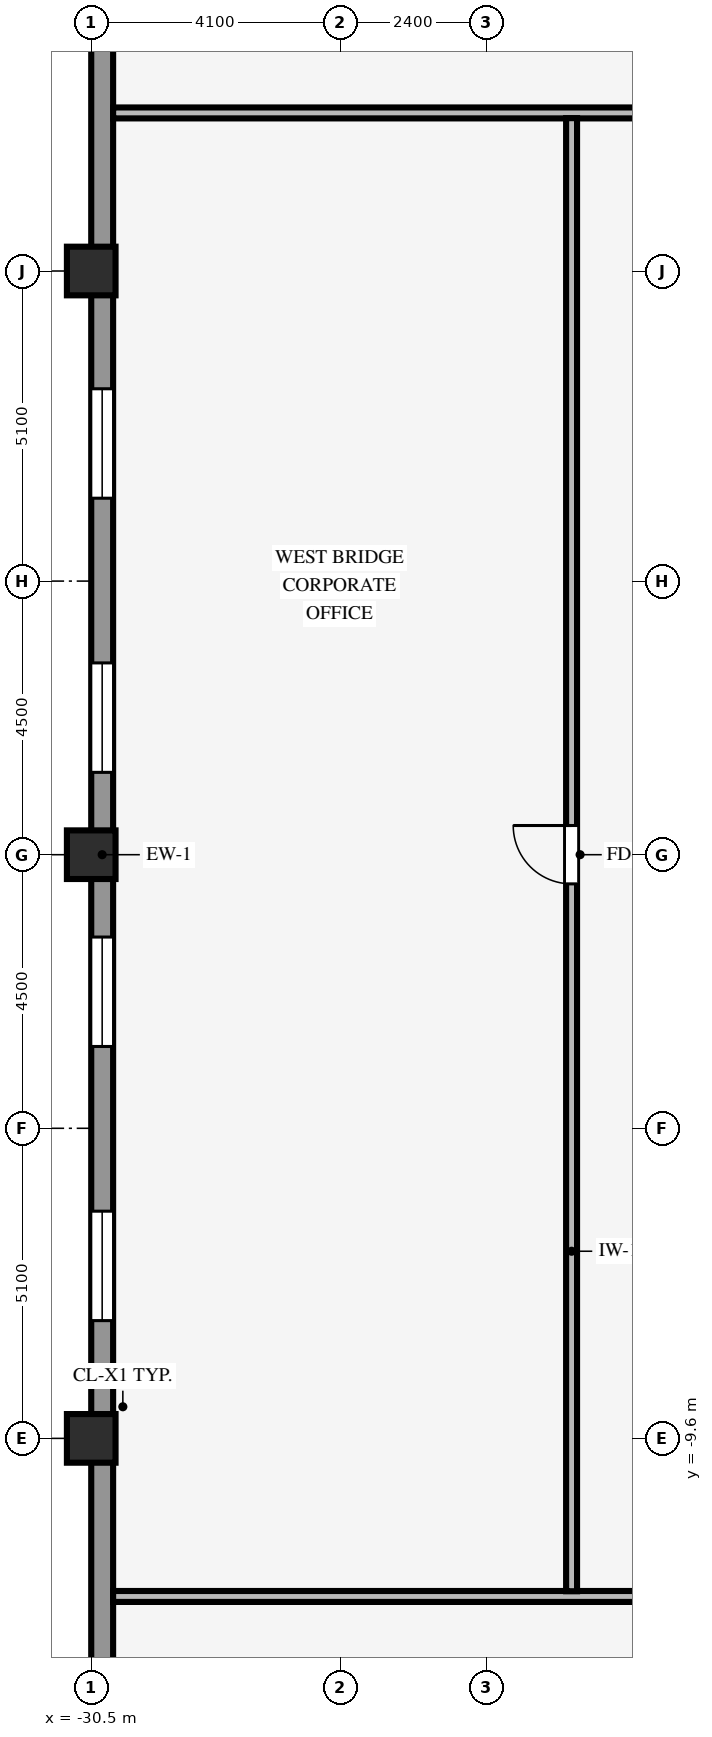
"""IFC4 building model, lengths in metres.
Left out: names, types, materials, properties, quantities, classifications, styles, units other than length and angle.
Written with IfcOpenShell. Run it as: python <this file> out.ifc"""

import sys

from ifc_helpers import new_model, si_unit, direction, frame, frame_2d, origin, origin_2d, place, context, subcontext, project, spatial, rectangle, hollow_rectangle, extrude, source, transform, mapped, element, fill, save


model = new_model("IFC4")
c1 = context("Model", 3, precision=1e-05, world=origin(), true_north=direction((0.0, 1.0)))
c2 = subcontext(c1, "Body", "Model", "MODEL_VIEW")
j1 = project(units=[si_unit("LENGTHUNIT", "METRE"), si_unit("PLANEANGLEUNIT", "RADIAN")], contexts=[c1])
p1 = place(None, origin())
s1 = spatial("IfcSite", under=j1, at=p1, CompositionType="ELEMENT")
p2 = place(p1, origin())
s2 = spatial("IfcBuilding", under=s1, at=p2, CompositionType="ELEMENT")
p3 = place(p2, frame((0.0, 0.0, 18.4)))
s3 = spatial("IfcBuildingStorey", under=s2, at=p3, CompositionType="ELEMENT", Elevation=18.4)
for number, where, z_axis, x_axis in (
    (1, (-30.5, -9.6, 0.0), (0.0, 0.0, 1.0), (1.0, 0.0, 0.0)),
    (2, (-30.5, 0.0, 0.0), (0.0, 0.0, 1.0), (1.0, 0.0, 0.0)),
    (3, (-30.5, 9.6, 0.0), (0.0, 0.0, 1.0), (1.0, 0.0, 0.0)),
):
    element("IfcColumn", number, at=place(p3, frame(where, z_axis=z_axis, x_axis=x_axis)), inside=s3, PredefinedType="COLUMN", context=c2, shape_type="SweptSolid", body=[
        extrude(hollow_rectangle(XDim=0.8, YDim=0.8, WallThickness=0.055, InnerFilletRadius=0.055, OuterFilletRadius=0.11, at=origin_2d()), origin(), (0.0, 0.0, 1.0), 4.2),
    ])
p4 = place(p3, frame((-30.32, -23.544, 0.0), z_axis=(0.0, 0.0, 1.0), x_axis=(0.0, 1.0, 0.0)))
e4 = element("IfcWall", 4, at=p4, inside=s3, PredefinedType="STANDARD", context=c2, shape_type="SweptSolid", body=[
    extrude(rectangle(XDim=47.088, YDim=0.36, at=frame_2d((23.544, 0.0))), origin(), (0.0, 0.0, 1.0), 3.535),
])
p5 = place(p4, frame((2.354, 0.0, 0.85)))
e5 = element("IfcOpeningElement", 5, at=p5, cuts=e4, PredefinedType="OPENING", context=c2, shape_type="SweptSolid", body=[
    extrude(rectangle(XDim=1.8, YDim=2.35, at=frame_2d((0.9, 1.175))), frame((0.0, 0.19, 0.0), z_axis=(0.0, -1.0, 0.0), x_axis=(1.0, 0.0, 0.0)), (0.0, 0.0, 1.0), 0.38),
])
p6 = place(p4, frame((7.313, 0.0, 0.85)))
e6 = element("IfcOpeningElement", 6, at=p6, cuts=e4, PredefinedType="OPENING", context=c2, shape_type="SweptSolid", body=[
    extrude(rectangle(XDim=1.8, YDim=2.35, at=frame_2d((0.9, 1.175))), frame((0.0, 0.19, 0.0), z_axis=(0.0, -1.0, 0.0), x_axis=(1.0, 0.0, 0.0)), (0.0, 0.0, 1.0), 0.38),
])
p7 = place(p4, frame((15.881, 0.0, 0.85)))
e7 = element("IfcOpeningElement", 7, at=p7, cuts=e4, PredefinedType="OPENING", context=c2, shape_type="SweptSolid", body=[
    extrude(rectangle(XDim=1.8, YDim=2.35, at=frame_2d((0.9, 1.175))), frame((0.0, 0.19, 0.0), z_axis=(0.0, -1.0, 0.0), x_axis=(1.0, 0.0, 0.0)), (0.0, 0.0, 1.0), 0.38),
])
p8 = place(p4, frame((20.39, 0.0, 0.85)))
e8 = element("IfcOpeningElement", 8, at=p8, cuts=e4, PredefinedType="OPENING", context=c2, shape_type="SweptSolid", body=[
    extrude(rectangle(XDim=1.8, YDim=2.35, at=frame_2d((0.9, 1.175))), frame((0.0, 0.19, 0.0), z_axis=(0.0, -1.0, 0.0), x_axis=(1.0, 0.0, 0.0)), (0.0, 0.0, 1.0), 0.38),
])
p9 = place(p4, frame((24.898, 0.0, 0.85)))
e9 = element("IfcOpeningElement", 9, at=p9, cuts=e4, PredefinedType="OPENING", context=c2, shape_type="SweptSolid", body=[
    extrude(rectangle(XDim=1.8, YDim=2.35, at=frame_2d((0.9, 1.175))), frame((0.0, 0.19, 0.0), z_axis=(0.0, -1.0, 0.0), x_axis=(1.0, 0.0, 0.0)), (0.0, 0.0, 1.0), 0.38),
])
p10 = place(p4, frame((29.407, 0.0, 0.85)))
e10 = element("IfcOpeningElement", 10, at=p10, cuts=e4, PredefinedType="OPENING", context=c2, shape_type="SweptSolid", body=[
    extrude(rectangle(XDim=1.8, YDim=2.35, at=frame_2d((0.9, 1.175))), frame((0.0, 0.19, 0.0), z_axis=(0.0, -1.0, 0.0), x_axis=(1.0, 0.0, 0.0)), (0.0, 0.0, 1.0), 0.38),
])
p11 = place(p4, frame((37.975, 0.0, 0.85)))
e11 = element("IfcOpeningElement", 11, at=p11, cuts=e4, PredefinedType="OPENING", context=c2, shape_type="SweptSolid", body=[
    extrude(rectangle(XDim=1.8, YDim=2.35, at=frame_2d((0.9, 1.175))), frame((0.0, 0.19, 0.0), z_axis=(0.0, -1.0, 0.0), x_axis=(1.0, 0.0, 0.0)), (0.0, 0.0, 1.0), 0.38),
])
p12 = place(p4, frame((42.934, 0.0, 0.85)))
e12 = element("IfcOpeningElement", 12, at=p12, cuts=e4, PredefinedType="OPENING", context=c2, shape_type="SweptSolid", body=[
    extrude(rectangle(XDim=1.8, YDim=2.35, at=frame_2d((0.9, 1.175))), frame((0.0, 0.19, 0.0), z_axis=(0.0, -1.0, 0.0), x_axis=(1.0, 0.0, 0.0)), (0.0, 0.0, 1.0), 0.38),
])
p13 = place(p3, frame((-30.14, -12.2, 0.0), z_axis=(0.0, 0.0, 1.0), x_axis=(1.0, 0.0, 0.0)))
e13 = element("IfcWall", 13, at=p13, inside=s3, PredefinedType="PARTITIONING", context=c2, shape_type="SweptSolid", body=[
    extrude(rectangle(XDim=18.74, YDim=0.18, at=frame_2d((9.37, 0.0))), origin(), (0.0, 0.0, 1.0), 4.19),
])
p14 = place(p13, frame((14.06, 0.0, 0.0)))
e14 = element("IfcOpeningElement", 14, at=p14, cuts=e13, PredefinedType="OPENING", context=c2, shape_type="SweptSolid", body=[
    extrude(rectangle(XDim=0.96, YDim=2.1, at=frame_2d((0.48, 1.05))), frame((0.0, 0.1, 0.0), z_axis=(0.0, -1.0, 0.0), x_axis=(1.0, 0.0, 0.0)), (0.0, 0.0, 1.0), 0.2),
])
p15 = place(p3, frame((-30.14, 12.2, 0.0), z_axis=(0.0, 0.0, 1.0), x_axis=(1.0, 0.0, 0.0)))
e15 = element("IfcWall", 15, at=p15, inside=s3, PredefinedType="PARTITIONING", context=c2, shape_type="SweptSolid", body=[
    extrude(rectangle(XDim=18.74, YDim=0.18, at=frame_2d((9.37, 0.0))), origin(), (0.0, 0.0, 1.0), 4.19),
])
p16 = place(p15, frame((14.06, 0.0, 0.0)))
e16 = element("IfcOpeningElement", 16, at=p16, cuts=e15, PredefinedType="OPENING", context=c2, shape_type="SweptSolid", body=[
    extrude(rectangle(XDim=0.96, YDim=2.1, at=frame_2d((0.48, 1.05))), frame((0.0, 0.1, 0.0), z_axis=(0.0, -1.0, 0.0), x_axis=(1.0, 0.0, 0.0)), (0.0, 0.0, 1.0), 0.2),
])
p17 = place(p3, frame((-22.6, -12.114, 0.0), z_axis=(0.0, 0.0, 1.0), x_axis=(0.0, 1.0, 0.0)))
e17 = element("IfcWall", 17, at=p17, inside=s3, PredefinedType="PARTITIONING", context=c2, shape_type="SweptSolid", body=[
    extrude(rectangle(XDim=24.228, YDim=0.18, at=frame_2d((12.114, 0.0))), origin(), (0.0, 0.0, 1.0), 4.19),
])
p18 = place(p17, frame((11.634, 0.0, 0.0)))
e18 = element("IfcOpeningElement", 18, at=p18, cuts=e17, PredefinedType="OPENING", context=c2, shape_type="SweptSolid", body=[
    extrude(rectangle(XDim=0.96, YDim=2.1, at=frame_2d((0.48, 1.05))), frame((0.0, 0.1, 0.0), z_axis=(0.0, -1.0, 0.0), x_axis=(1.0, 0.0, 0.0)), (0.0, 0.0, 1.0), 0.2),
])
m1 = source(origin(), c2, "Body", "SweptSolid", [
    extrude(rectangle(XDim=1.8, YDim=2.35, at=frame_2d((0.9, 1.175))), frame((0.0, 0.03, 0.0), z_axis=(0.0, -1.0, 0.0), x_axis=(1.0, 0.0, 0.0)), (0.0, 0.0, 1.0), 0.06),
])
p19 = place(p7, origin())
e19 = element("IfcWindow", 19, at=p19, inside=s3, PartitioningType="SINGLE_PANEL", PredefinedType="WINDOW", context=c2, shape_type="MappedRepresentation", body=[
    mapped(m1, transform((0.0, 0.0, 0.0), scale=1.0)),
])
fill(e7, e19)
p20 = place(p8, origin())
e20 = element("IfcWindow", 20, at=p20, inside=s3, PartitioningType="SINGLE_PANEL", PredefinedType="WINDOW", context=c2, shape_type="MappedRepresentation", body=[
    mapped(m1, transform((0.0, 0.0, 0.0), scale=1.0)),
])
fill(e8, e20)
p21 = place(p9, origin())
e21 = element("IfcWindow", 21, at=p21, inside=s3, PartitioningType="SINGLE_PANEL", PredefinedType="WINDOW", context=c2, shape_type="MappedRepresentation", body=[
    mapped(m1, transform((0.0, 0.0, 0.0), scale=1.0)),
])
fill(e9, e21)
p22 = place(p10, origin())
e22 = element("IfcWindow", 22, at=p22, inside=s3, PartitioningType="SINGLE_PANEL", PredefinedType="WINDOW", context=c2, shape_type="MappedRepresentation", body=[
    mapped(m1, transform((0.0, 0.0, 0.0), scale=1.0)),
])
fill(e10, e22)
m2 = source(origin(), c2, "Body", "SweptSolid", [
    extrude(rectangle(XDim=0.96, YDim=2.1, at=frame_2d((0.48, 1.05))), frame((0.0, 0.025, 0.0), z_axis=(0.0, -1.0, 0.0), x_axis=(1.0, 0.0, 0.0)), (0.0, 0.0, 1.0), 0.05),
])
p23 = place(p18, origin())
e23 = element("IfcDoor", 23, at=p23, inside=s3, OperationType="SINGLE_SWING_RIGHT", PredefinedType="DOOR", context=c2, shape_type="MappedRepresentation", body=[
    mapped(m2, transform((0.0, 0.0, 0.0), scale=1.0)),
])
fill(e18, e23)
save(model, sys.argv[1])
